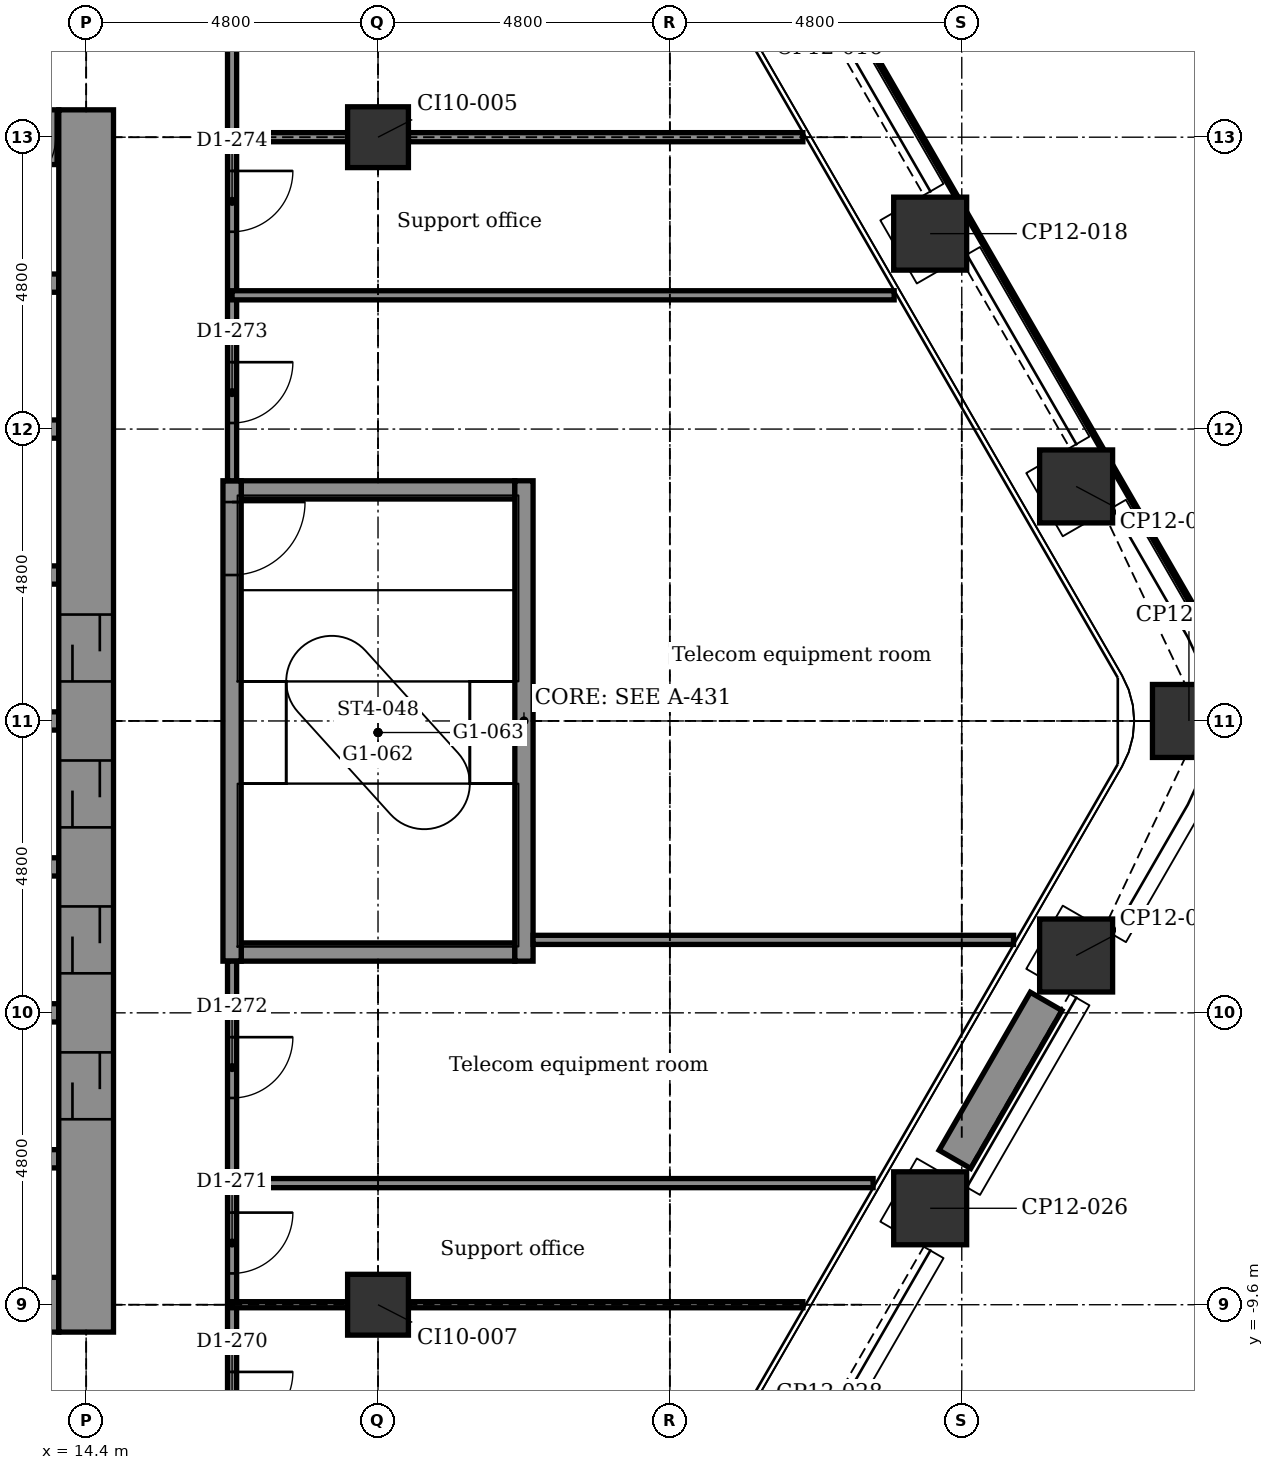
"""IFC4 building model, lengths in metres.
Left out: names, types, materials, properties, quantities, classifications, styles, units other than length and angle.
Written with IfcOpenShell. Run it as: python <this file> out.ifc"""

import sys

from ifc_helpers import new_model, si_unit, direction, frame, frame_2d, origin, origin_2d, place, context, subcontext, project, spatial, rectangle, extrude, element, fill, save


model = new_model("IFC4")
c1 = context("Model", 3, precision=1e-05, world=origin(), true_north=direction((0.0, 1.0)))
c2 = subcontext(c1, "Body", "Model", "MODEL_VIEW")
j1 = project(units=[si_unit("LENGTHUNIT", "METRE"), si_unit("PLANEANGLEUNIT", "RADIAN")], contexts=[c1])
p1 = place(None, origin())
s1 = spatial("IfcSite", under=j1, at=p1, CompositionType="ELEMENT")
p2 = place(p1, origin())
s2 = spatial("IfcBuilding", under=s1, at=p2, CompositionType="ELEMENT")
p3 = place(p2, frame((0.0, 0.0, 95.9)))
s3 = spatial("IfcBuildingStorey", under=s2, at=p3, CompositionType="ELEMENT", Elevation=95.9)
for number, where, z_axis, x_axis in (
    (1, (28.28, 8.014, -0.2), (0.0, 0.0, 1.0), (0.866, 0.5, 0.0)),
    (2, (30.68, 3.857, -0.2), (0.0, 0.0, 1.0), (0.866, 0.5, 0.0)),
    (3, (32.536, 0.0, -0.2), (0.0, 0.0, 1.0), (1.0, 0.0, 0.0)),
    (4, (30.68, -3.857, -0.2), (0.0, 0.0, 1.0), (0.5, 0.866, 0.0)),
    (5, (28.28, -8.014, -0.2), (0.0, 0.0, 1.0), (0.5, 0.866, 0.0)),
):
    element("IfcColumn", number, at=place(p3, frame(where, z_axis=z_axis, x_axis=x_axis)), inside=s3, PredefinedType="COLUMN", context=c2, shape_type="SweptSolid", body=[
        extrude(rectangle(XDim=1.2, YDim=1.2, at=origin_2d()), origin(), (0.0, 0.0, 1.0), 4.5),
    ])
for number, where, z_axis, x_axis in (
    (6, (19.2, -9.6, -0.2), (0.0, 0.0, 1.0), (1.0, 0.0, 0.0)),
    (7, (19.2, 9.6, -0.2), (0.0, 0.0, 1.0), (1.0, 0.0, 0.0)),
):
    element("IfcColumn", number, at=place(p3, frame(where, z_axis=z_axis, x_axis=x_axis)), inside=s3, PredefinedType="COLUMN", context=c2, shape_type="SweptSolid", body=[
        extrude(rectangle(XDim=1.0, YDim=1.0, at=origin_2d()), origin(), (0.0, 0.0, 1.0), 4.5),
    ])
p4 = place(p3, frame((10.05, -9.6, -0.2), z_axis=(0.0, 0.0, 1.0), x_axis=(1.0, 0.0, 0.0)))
e8 = element("IfcWall", 8, at=p4, inside=s3, PredefinedType="SHEAR", context=c2, shape_type="SweptSolid", body=[
    extrude(rectangle(XDim=3.9, YDim=0.9, at=frame_2d((1.95, 0.0))), origin(), (0.0, 0.0, 1.0), 4.5),
])
p5 = place(p4, frame((0.05, 0.0, 0.2)))
e9 = element("IfcOpeningElement", 9, at=p5, cuts=e8, PredefinedType="OPENING", context=c2, shape_type="SweptSolid", body=[
    extrude(rectangle(XDim=0.9, YDim=2.1, at=frame_2d((0.45, 1.05))), frame((0.0, 0.46, 0.0), z_axis=(0.0, -1.0, 0.0), x_axis=(1.0, 0.0, 0.0)), (0.0, 0.0, 1.0), 0.92),
])
p6 = place(p4, frame((2.3, 0.0, 0.2)))
e10 = element("IfcOpeningElement", 10, at=p6, cuts=e8, PredefinedType="OPENING", context=c2, shape_type="SweptSolid", body=[
    extrude(rectangle(XDim=0.9, YDim=2.1, at=frame_2d((0.45, 1.05))), frame((0.0, 0.46, 0.0), z_axis=(0.0, -1.0, 0.0), x_axis=(1.0, 0.0, 0.0)), (0.0, 0.0, 1.0), 0.92),
])
for number, where, z_axis, x_axis in (
    (11, (10.05, -7.2, -0.2), (0.0, 0.0, 1.0), (1.0, 0.0, 0.0)),
    (12, (10.05, -4.8, -0.2), (0.0, 0.0, 1.0), (1.0, 0.0, 0.0)),
):
    element("IfcWall", number, at=place(p3, frame(where, z_axis=z_axis, x_axis=x_axis)), inside=s3, PredefinedType="STANDARD", context=c2, shape_type="SweptSolid", body=[
        extrude(rectangle(XDim=3.9, YDim=0.3, at=frame_2d((1.95, 0.0))), origin(), (0.0, 0.0, 1.0), 4.5),
    ])
p7 = place(p3, frame((16.95, -3.8, -0.2), z_axis=(0.0, 0.0, 1.0), x_axis=(1.0, 0.0, 0.0)))
e13 = element("IfcWall", 13, at=p7, inside=s3, PredefinedType="STANDARD", context=c2, shape_type="SweptSolid", body=[
    extrude(rectangle(XDim=4.5, YDim=0.3, at=frame_2d((2.25, 0.0))), origin(), (0.0, 0.0, 1.0), 4.5),
])
for number, where, z_axis, x_axis in (
    (14, (10.05, -2.4, -0.2), (0.0, 0.0, 1.0), (1.0, 0.0, 0.0)),
    (15, (10.05, 0.0, -0.2), (0.0, 0.0, 1.0), (1.0, 0.0, 0.0)),
    (16, (10.05, 2.4, -0.2), (0.0, 0.0, 1.0), (1.0, 0.0, 0.0)),
):
    element("IfcWall", number, at=place(p3, frame(where, z_axis=z_axis, x_axis=x_axis)), inside=s3, PredefinedType="STANDARD", context=c2, shape_type="SweptSolid", body=[
        extrude(rectangle(XDim=3.9, YDim=0.3, at=frame_2d((1.95, 0.0))), origin(), (0.0, 0.0, 1.0), 4.5),
    ])
p8 = place(p3, frame((16.95, 3.8, -0.2), z_axis=(0.0, 0.0, 1.0), x_axis=(1.0, 0.0, 0.0)))
e17 = element("IfcWall", 17, at=p8, inside=s3, PredefinedType="STANDARD", context=c2, shape_type="SweptSolid", body=[
    extrude(rectangle(XDim=4.5, YDim=0.3, at=frame_2d((2.25, 0.0))), origin(), (0.0, 0.0, 1.0), 4.5),
])
for number, where, z_axis, x_axis in (
    (18, (10.05, 4.8, -0.2), (0.0, 0.0, 1.0), (1.0, 0.0, 0.0)),
    (19, (10.05, 7.2, -0.2), (0.0, 0.0, 1.0), (1.0, 0.0, 0.0)),
):
    element("IfcWall", number, at=place(p3, frame(where, z_axis=z_axis, x_axis=x_axis)), inside=s3, PredefinedType="STANDARD", context=c2, shape_type="SweptSolid", body=[
        extrude(rectangle(XDim=3.9, YDim=0.3, at=frame_2d((1.95, 0.0))), origin(), (0.0, 0.0, 1.0), 4.5),
    ])
p9 = place(p3, frame((10.05, 9.6, -0.2), z_axis=(0.0, 0.0, 1.0), x_axis=(1.0, 0.0, 0.0)))
e20 = element("IfcWall", 20, at=p9, inside=s3, PredefinedType="SHEAR", context=c2, shape_type="SweptSolid", body=[
    extrude(rectangle(XDim=3.9, YDim=0.9, at=frame_2d((1.95, 0.0))), origin(), (0.0, 0.0, 1.0), 4.5),
])
p10 = place(p9, frame((0.05, 0.0, 0.2)))
e21 = element("IfcOpeningElement", 21, at=p10, cuts=e20, PredefinedType="OPENING", context=c2, shape_type="SweptSolid", body=[
    extrude(rectangle(XDim=0.9, YDim=2.1, at=frame_2d((0.45, 1.05))), frame((0.0, 0.46, 0.0), z_axis=(0.0, -1.0, 0.0), x_axis=(1.0, 0.0, 0.0)), (0.0, 0.0, 1.0), 0.92),
])
p11 = place(p9, frame((1.5, 0.0, 0.2)))
e22 = element("IfcOpeningElement", 22, at=p11, cuts=e20, PredefinedType="OPENING", context=c2, shape_type="SweptSolid", body=[
    extrude(rectangle(XDim=0.9, YDim=2.1, at=frame_2d((0.45, 1.05))), frame((0.0, 0.46, 0.0), z_axis=(0.0, -1.0, 0.0), x_axis=(1.0, 0.0, 0.0)), (0.0, 0.0, 1.0), 0.92),
])
p12 = place(p9, frame((2.95, 0.0, 0.2)))
e23 = element("IfcOpeningElement", 23, at=p12, cuts=e20, PredefinedType="OPENING", context=c2, shape_type="SweptSolid", body=[
    extrude(rectangle(XDim=0.9, YDim=2.1, at=frame_2d((0.45, 1.05))), frame((0.0, 0.46, 0.0), z_axis=(0.0, -1.0, 0.0), x_axis=(1.0, 0.0, 0.0)), (0.0, 0.0, 1.0), 0.92),
])
p13 = place(p3, frame((14.4, -10.05, -0.2), z_axis=(0.0, 0.0, 1.0), x_axis=(0.0, 1.0, 0.0)))
e24 = element("IfcWall", 24, at=p13, inside=s3, PredefinedType="SHEAR", context=c2, shape_type="SweptSolid", body=[
    extrude(rectangle(XDim=20.1, YDim=0.9, at=frame_2d((10.05, 0.0))), origin(), (0.0, 0.0, 1.0), 4.5),
])
p14 = place(p13, frame((3.5, 0.0, 0.2)))
e25 = element("IfcOpeningElement", 25, at=p14, cuts=e24, PredefinedType="OPENING", context=c2, shape_type="SweptSolid", body=[
    extrude(rectangle(XDim=1.1, YDim=2.1, at=frame_2d((0.55, 1.05))), frame((0.0, 0.46, 0.0), z_axis=(0.0, -1.0, 0.0), x_axis=(1.0, 0.0, 0.0)), (0.0, 0.0, 1.0), 0.92),
])
p15 = place(p13, frame((5.9, 0.0, 0.2)))
e26 = element("IfcOpeningElement", 26, at=p15, cuts=e24, PredefinedType="OPENING", context=c2, shape_type="SweptSolid", body=[
    extrude(rectangle(XDim=1.1, YDim=2.1, at=frame_2d((0.55, 1.05))), frame((0.0, 0.46, 0.0), z_axis=(0.0, -1.0, 0.0), x_axis=(1.0, 0.0, 0.0)), (0.0, 0.0, 1.0), 0.92),
])
p16 = place(p13, frame((8.3, 0.0, 0.2)))
e27 = element("IfcOpeningElement", 27, at=p16, cuts=e24, PredefinedType="OPENING", context=c2, shape_type="SweptSolid", body=[
    extrude(rectangle(XDim=1.1, YDim=2.1, at=frame_2d((0.55, 1.05))), frame((0.0, 0.46, 0.0), z_axis=(0.0, -1.0, 0.0), x_axis=(1.0, 0.0, 0.0)), (0.0, 0.0, 1.0), 0.92),
])
p17 = place(p13, frame((10.7, 0.0, 0.2)))
e28 = element("IfcOpeningElement", 28, at=p17, cuts=e24, PredefinedType="OPENING", context=c2, shape_type="SweptSolid", body=[
    extrude(rectangle(XDim=1.1, YDim=2.1, at=frame_2d((0.55, 1.05))), frame((0.0, 0.46, 0.0), z_axis=(0.0, -1.0, 0.0), x_axis=(1.0, 0.0, 0.0)), (0.0, 0.0, 1.0), 0.92),
])
p18 = place(p3, frame((16.8, -3.95, -0.2), z_axis=(0.0, 0.0, 1.0), x_axis=(0.0, 1.0, 0.0)))
e29 = element("IfcWall", 29, at=p18, inside=s3, PredefinedType="STANDARD", context=c2, shape_type="SweptSolid", body=[
    extrude(rectangle(XDim=7.9, YDim=0.3, at=frame_2d((3.95, 0.0))), origin(), (0.0, 0.0, 1.0), 4.5),
])
p19 = place(p18, frame((6.35, 0.0, 0.2)))
e30 = element("IfcOpeningElement", 30, at=p19, cuts=e29, PredefinedType="OPENING", context=c2, shape_type="SweptSolid", body=[
    extrude(rectangle(XDim=1.2, YDim=2.1, at=frame_2d((0.6, 1.05))), frame((0.0, 0.16, 0.0), z_axis=(0.0, -1.0, 0.0), x_axis=(1.0, 0.0, 0.0)), (0.0, 0.0, 1.0), 0.32),
])
p20 = place(p3, frame((21.6, -3.95, -0.2), z_axis=(0.0, 0.0, 1.0), x_axis=(0.0, 1.0, 0.0)))
e31 = element("IfcWall", 31, at=p20, inside=s3, PredefinedType="STANDARD", context=c2, shape_type="SweptSolid", body=[
    extrude(rectangle(XDim=7.9, YDim=0.3, at=frame_2d((3.95, 0.0))), origin(), (0.0, 0.0, 1.0), 4.5),
])
p21 = place(p3, frame((30.187, -4.611, 0.0), z_axis=(0.0, 0.0, 1.0), x_axis=(-0.499990139034, -0.866031096941, 0.0)))
e32 = element("IfcWall", 32, at=p21, inside=s3, PredefinedType="USERDEFINED", context=c2, shape_type="SweptSolid", body=[
    extrude(rectangle(XDim=3.0, YDim=0.6, at=frame_2d((1.5, 0.0))), origin(), (0.0, 0.0, 1.0), 0.7),
])
p22 = place(p3, frame((16.8, -13.6, 0.0), z_axis=(0.0, 0.0, 1.0), x_axis=(0.0, 1.0, 0.0)))
e33 = element("IfcWall", 33, at=p22, inside=s3, PredefinedType="PARTITIONING", context=c2, shape_type="SweptSolid", body=[
    extrude(rectangle(XDim=9.65, YDim=0.15, at=frame_2d((4.825, 0.0))), origin(), (0.0, 0.0, 1.0), 4.3),
])
p23 = place(p22, frame((1.895, 0.0, 0.0)))
e34 = element("IfcOpeningElement", 34, at=p23, cuts=e33, PredefinedType="OPENING", context=c2, shape_type="SweptSolid", body=[
    extrude(rectangle(XDim=1.0, YDim=2.1, at=frame_2d((0.5, 1.05))), frame((0.0, 0.085, 0.0), z_axis=(0.0, -1.0, 0.0), x_axis=(1.0, 0.0, 0.0)), (0.0, 0.0, 1.0), 0.17),
])
p24 = place(p22, frame((4.515, 0.0, 0.0)))
e35 = element("IfcOpeningElement", 35, at=p24, cuts=e33, PredefinedType="OPENING", context=c2, shape_type="SweptSolid", body=[
    extrude(rectangle(XDim=1.0, YDim=2.1, at=frame_2d((0.5, 1.05))), frame((0.0, 0.085, 0.0), z_axis=(0.0, -1.0, 0.0), x_axis=(1.0, 0.0, 0.0)), (0.0, 0.0, 1.0), 0.17),
])
p25 = place(p22, frame((7.4, 0.0, 0.0)))
e36 = element("IfcOpeningElement", 36, at=p25, cuts=e33, PredefinedType="OPENING", context=c2, shape_type="SweptSolid", body=[
    extrude(rectangle(XDim=1.0, YDim=2.1, at=frame_2d((0.5, 1.05))), frame((0.0, 0.085, 0.0), z_axis=(0.0, -1.0, 0.0), x_axis=(1.0, 0.0, 0.0)), (0.0, 0.0, 1.0), 0.17),
])
p26 = place(p3, frame((16.8, 3.95, 0.0), z_axis=(0.0, 0.0, 1.0), x_axis=(0.0, 1.0, 0.0)))
e37 = element("IfcWall", 37, at=p26, inside=s3, PredefinedType="PARTITIONING", context=c2, shape_type="SweptSolid", body=[
    extrude(rectangle(XDim=9.65, YDim=0.15, at=frame_2d((4.825, 0.0))), origin(), (0.0, 0.0, 1.0), 4.3),
])
p27 = place(p26, frame((0.95, 0.0, 0.0)))
e38 = element("IfcOpeningElement", 38, at=p27, cuts=e37, PredefinedType="OPENING", context=c2, shape_type="SweptSolid", body=[
    extrude(rectangle(XDim=1.0, YDim=2.1, at=frame_2d((0.5, 1.05))), frame((0.0, 0.085, 0.0), z_axis=(0.0, -1.0, 0.0), x_axis=(1.0, 0.0, 0.0)), (0.0, 0.0, 1.0), 0.17),
])
p28 = place(p26, frame((4.095, 0.0, 0.0)))
e39 = element("IfcOpeningElement", 39, at=p28, cuts=e37, PredefinedType="OPENING", context=c2, shape_type="SweptSolid", body=[
    extrude(rectangle(XDim=1.0, YDim=2.1, at=frame_2d((0.5, 1.05))), frame((0.0, 0.085, 0.0), z_axis=(0.0, -1.0, 0.0), x_axis=(1.0, 0.0, 0.0)), (0.0, 0.0, 1.0), 0.17),
])
p29 = place(p26, frame((7.35, 0.0, 0.0)))
e40 = element("IfcOpeningElement", 40, at=p29, cuts=e37, PredefinedType="OPENING", context=c2, shape_type="SweptSolid", body=[
    extrude(rectangle(XDim=1.0, YDim=2.1, at=frame_2d((0.5, 1.05))), frame((0.0, 0.085, 0.0), z_axis=(0.0, -1.0, 0.0), x_axis=(1.0, 0.0, 0.0)), (0.0, 0.0, 1.0), 0.17),
])
p30 = place(p3, frame((16.8, -9.6, 0.0), z_axis=(0.0, 0.0, 1.0), x_axis=(1.0, 0.0, 0.0)))
e41 = element("IfcWall", 41, at=p30, inside=s3, PredefinedType="PARTITIONING", context=c2, shape_type="SweptSolid", body=[
    extrude(rectangle(XDim=1.9, YDim=0.1, at=frame_2d((0.95, 0.0))), origin(), (0.0, 0.0, 1.0), 3.692),
])
p31 = place(p3, frame((19.7, -9.6, 0.0), z_axis=(0.0, 0.0, 1.0), x_axis=(1.0, 0.0, 0.0)))
e42 = element("IfcWall", 42, at=p31, inside=s3, PredefinedType="PARTITIONING", context=c2, shape_type="SweptSolid", body=[
    extrude(rectangle(XDim=6.487, YDim=0.1, at=frame_2d((3.243, 0.0))), origin(), (0.0, 0.0, 1.0), 3.692),
])
p32 = place(p3, frame((16.8, -7.6, 0.0), z_axis=(0.0, 0.0, 1.0), x_axis=(1.0, 0.0, 0.0)))
e43 = element("IfcWall", 43, at=p32, inside=s3, PredefinedType="PARTITIONING", context=c2, shape_type="SweptSolid", body=[
    extrude(rectangle(XDim=10.542, YDim=0.15, at=frame_2d((5.271, 0.0))), origin(), (0.0, 0.0, 1.0), 4.3),
])
p33 = place(p3, frame((21.75, -3.6, 0.0), z_axis=(0.0, 0.0, 1.0), x_axis=(1.0, 0.0, 0.0)))
e44 = element("IfcWall", 44, at=p33, inside=s3, PredefinedType="PARTITIONING", context=c2, shape_type="SweptSolid", body=[
    extrude(rectangle(XDim=7.901, YDim=0.15, at=frame_2d((3.95, 0.0))), origin(), (0.0, 0.0, 1.0), 4.3),
])
p34 = place(p3, frame((16.8, 7.0, 0.0), z_axis=(0.0, 0.0, 1.0), x_axis=(1.0, 0.0, 0.0)))
e45 = element("IfcWall", 45, at=p34, inside=s3, PredefinedType="PARTITIONING", context=c2, shape_type="SweptSolid", body=[
    extrude(rectangle(XDim=10.888, YDim=0.15, at=frame_2d((5.444, 0.0))), origin(), (0.0, 0.0, 1.0), 4.3),
])
p35 = place(p3, frame((16.8, 9.6, 0.0), z_axis=(0.0, 0.0, 1.0), x_axis=(1.0, 0.0, 0.0)))
e46 = element("IfcWall", 46, at=p35, inside=s3, PredefinedType="PARTITIONING", context=c2, shape_type="SweptSolid", body=[
    extrude(rectangle(XDim=1.9, YDim=0.15, at=frame_2d((0.95, 0.0))), origin(), (0.0, 0.0, 1.0), 3.692),
])
p36 = place(p3, frame((19.7, 9.6, 0.0), z_axis=(0.0, 0.0, 1.0), x_axis=(1.0, 0.0, 0.0)))
e47 = element("IfcWall", 47, at=p36, inside=s3, PredefinedType="PARTITIONING", context=c2, shape_type="SweptSolid", body=[
    extrude(rectangle(XDim=6.487, YDim=0.15, at=frame_2d((3.243, 0.0))), origin(), (0.0, 0.0, 1.0), 3.692),
])
p37 = place(p23, frame((1.0, 0.0, 0.0), z_axis=(0.0, 0.0, 1.0), x_axis=(-1.0, 0.0, 0.0)))
e48 = element("IfcDoor", 48, at=p37, inside=s3, OperationType="SINGLE_SWING_RIGHT", PredefinedType="DOOR", context=c2, shape_type="SweptSolid", body=[
    extrude(rectangle(XDim=1.0, YDim=2.1, at=frame_2d((0.5, 1.05))), frame((0.0, 0.025, 0.0), z_axis=(0.0, -1.0, 0.0), x_axis=(1.0, 0.0, 0.0)), (0.0, 0.0, 1.0), 0.05),
])
fill(e34, e48)
p38 = place(p24, frame((1.0, 0.0, 0.0), z_axis=(0.0, 0.0, 1.0), x_axis=(-1.0, 0.0, 0.0)))
e49 = element("IfcDoor", 49, at=p38, inside=s3, OperationType="SINGLE_SWING_RIGHT", PredefinedType="DOOR", context=c2, shape_type="SweptSolid", body=[
    extrude(rectangle(XDim=1.0, YDim=2.1, at=frame_2d((0.5, 1.05))), frame((0.0, 0.025, 0.0), z_axis=(0.0, -1.0, 0.0), x_axis=(1.0, 0.0, 0.0)), (0.0, 0.0, 1.0), 0.05),
])
fill(e35, e49)
p39 = place(p25, frame((1.0, 0.0, 0.0), z_axis=(0.0, 0.0, 1.0), x_axis=(-1.0, 0.0, 0.0)))
e50 = element("IfcDoor", 50, at=p39, inside=s3, OperationType="SINGLE_SWING_RIGHT", PredefinedType="DOOR", context=c2, shape_type="SweptSolid", body=[
    extrude(rectangle(XDim=1.0, YDim=2.1, at=frame_2d((0.5, 1.05))), frame((0.0, 0.025, 0.0), z_axis=(0.0, -1.0, 0.0), x_axis=(1.0, 0.0, 0.0)), (0.0, 0.0, 1.0), 0.05),
])
fill(e36, e50)
p40 = place(p27, frame((1.0, 0.0, 0.0), z_axis=(0.0, 0.0, 1.0), x_axis=(-1.0, 0.0, 0.0)))
e51 = element("IfcDoor", 51, at=p40, inside=s3, OperationType="SINGLE_SWING_RIGHT", PredefinedType="DOOR", context=c2, shape_type="SweptSolid", body=[
    extrude(rectangle(XDim=1.0, YDim=2.1, at=frame_2d((0.5, 1.05))), frame((0.0, 0.025, 0.0), z_axis=(0.0, -1.0, 0.0), x_axis=(1.0, 0.0, 0.0)), (0.0, 0.0, 1.0), 0.05),
])
fill(e38, e51)
p41 = place(p28, frame((1.0, 0.0, 0.0), z_axis=(0.0, 0.0, 1.0), x_axis=(-1.0, 0.0, 0.0)))
e52 = element("IfcDoor", 52, at=p41, inside=s3, OperationType="SINGLE_SWING_RIGHT", PredefinedType="DOOR", context=c2, shape_type="SweptSolid", body=[
    extrude(rectangle(XDim=1.0, YDim=2.1, at=frame_2d((0.5, 1.05))), frame((0.0, 0.025, 0.0), z_axis=(0.0, -1.0, 0.0), x_axis=(1.0, 0.0, 0.0)), (0.0, 0.0, 1.0), 0.05),
])
fill(e39, e52)
p42 = place(p14, origin())
e53 = element("IfcDoor", 53, at=p42, inside=s3, OperationType="DOUBLE_DOOR_SLIDING", PredefinedType="DOOR", context=c2, shape_type="SweptSolid", body=[
    extrude(rectangle(XDim=1.1, YDim=2.1, at=frame_2d((0.55, 1.05))), frame((0.0, 0.025, 0.0), z_axis=(0.0, -1.0, 0.0), x_axis=(1.0, 0.0, 0.0)), (0.0, 0.0, 1.0), 0.05),
])
fill(e25, e53)
p43 = place(p15, origin())
e54 = element("IfcDoor", 54, at=p43, inside=s3, OperationType="DOUBLE_DOOR_SLIDING", PredefinedType="DOOR", context=c2, shape_type="SweptSolid", body=[
    extrude(rectangle(XDim=1.1, YDim=2.1, at=frame_2d((0.55, 1.05))), frame((0.0, 0.025, 0.0), z_axis=(0.0, -1.0, 0.0), x_axis=(1.0, 0.0, 0.0)), (0.0, 0.0, 1.0), 0.05),
])
fill(e26, e54)
p44 = place(p16, origin())
e55 = element("IfcDoor", 55, at=p44, inside=s3, OperationType="DOUBLE_DOOR_SLIDING", PredefinedType="DOOR", context=c2, shape_type="SweptSolid", body=[
    extrude(rectangle(XDim=1.1, YDim=2.1, at=frame_2d((0.55, 1.05))), frame((0.0, 0.025, 0.0), z_axis=(0.0, -1.0, 0.0), x_axis=(1.0, 0.0, 0.0)), (0.0, 0.0, 1.0), 0.05),
])
fill(e27, e55)
p45 = place(p17, origin())
e56 = element("IfcDoor", 56, at=p45, inside=s3, OperationType="DOUBLE_DOOR_SLIDING", PredefinedType="DOOR", context=c2, shape_type="SweptSolid", body=[
    extrude(rectangle(XDim=1.1, YDim=2.1, at=frame_2d((0.55, 1.05))), frame((0.0, 0.025, 0.0), z_axis=(0.0, -1.0, 0.0), x_axis=(1.0, 0.0, 0.0)), (0.0, 0.0, 1.0), 0.05),
])
fill(e28, e56)
p46 = place(p19, frame((1.2, 0.0, 0.0), z_axis=(0.0, 0.0, 1.0), x_axis=(-1.0, 0.0, 0.0)))
e57 = element("IfcDoor", 57, at=p46, inside=s3, OperationType="SINGLE_SWING_RIGHT", PredefinedType="DOOR", context=c2, shape_type="SweptSolid", body=[
    extrude(rectangle(XDim=1.2, YDim=2.1, at=frame_2d((0.6, 1.05))), frame((0.0, 0.025, 0.0), z_axis=(0.0, -1.0, 0.0), x_axis=(1.0, 0.0, 0.0)), (0.0, 0.0, 1.0), 0.05),
])
fill(e30, e57)
p47 = place(p12, frame((0.9, 0.0, 0.0), z_axis=(0.0, 0.0, 1.0), x_axis=(-1.0, 0.0, 0.0)))
e58 = element("IfcDoor", 58, at=p47, inside=s3, OperationType="SINGLE_SWING_LEFT", PredefinedType="DOOR", context=c2, shape_type="SweptSolid", body=[
    extrude(rectangle(XDim=0.9, YDim=2.1, at=frame_2d((0.45, 1.05))), frame((0.0, 0.025, 0.0), z_axis=(0.0, -1.0, 0.0), x_axis=(1.0, 0.0, 0.0)), (0.0, 0.0, 1.0), 0.05),
])
fill(e23, e58)
save(model, sys.argv[1])
